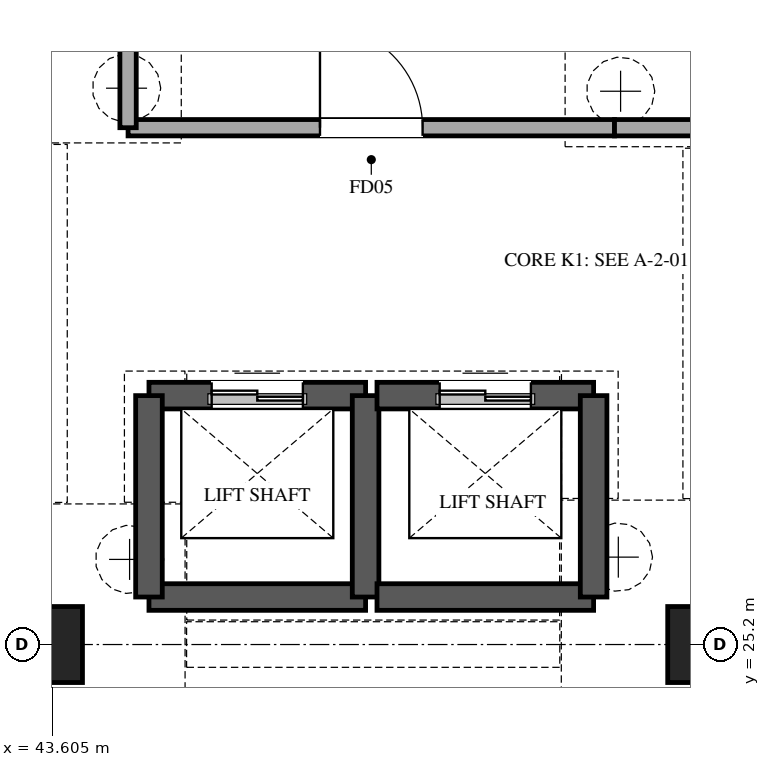
"""IFC4 building model, lengths in metres.
Left out: names, types, materials, properties, quantities, classifications, styles, units other than length and angle.
Written with IfcOpenShell. Run it as: python <this file> out.ifc"""

import sys

from ifc_helpers import new_model, si_unit, direction, frame, frame_2d, origin, origin_2d, place, context, subcontext, project, spatial, rectangle, extrude, element, fill, save


model = new_model("IFC4")
c1 = context("Model", 3, precision=1e-05, world=origin(), true_north=direction((0.0, 1.0)))
c2 = subcontext(c1, "Body", "Model", "MODEL_VIEW")
j1 = project(units=[si_unit("LENGTHUNIT", "METRE"), si_unit("PLANEANGLEUNIT", "RADIAN")], contexts=[c1])
p1 = place(None, origin())
s1 = spatial("IfcSite", under=j1, at=p1, CompositionType="ELEMENT")
p2 = place(p1, origin())
s2 = spatial("IfcBuilding", under=s1, at=p2, CompositionType="ELEMENT")
p3 = place(p2, frame((0.0, 0.0, -9.6)))
s3 = spatial("IfcBuildingStorey", under=s2, at=p3, CompositionType="ELEMENT", Elevation=-9.6)
for number, where, z_axis, x_axis in (
    (1, (43.5, 25.2, 0.0), (0.0, 0.0, 1.0), (1.0, 0.0, 0.0)),
    (2, (52.2, 25.2, 0.0), (0.0, 0.0, 1.0), (1.0, 0.0, 0.0)),
):
    element("IfcColumn", number, at=place(p3, frame(where, z_axis=z_axis, x_axis=x_axis)), inside=s3, PredefinedType="COLUMN", context=c2, shape_type="SweptSolid", body=[
        extrude(rectangle(XDim=1.0, YDim=1.0, at=origin_2d()), origin(), (0.0, 0.0, 1.0), 4.8),
    ])
p4 = place(p3, frame((44.875, 28.475, 0.0), z_axis=(0.0, 0.0, 1.0), x_axis=(1.0, 0.0, 0.0)))
e3 = element("IfcWall", 3, at=p4, inside=s3, PredefinedType="SHEAR", context=c2, shape_type="SweptSolid", body=[
    extrude(rectangle(XDim=2.85, YDim=0.35, at=frame_2d((1.425, 0.0))), origin(), (0.0, 0.0, 1.0), 4.8),
])
p5 = place(p4, frame((0.825, 0.0, 0.0)))
e4 = element("IfcOpeningElement", 4, at=p5, cuts=e3, PredefinedType="OPENING", context=c2, shape_type="SweptSolid", body=[
    extrude(rectangle(XDim=1.2, YDim=2.2, at=frame_2d((0.6, 1.1))), frame((0.0, 0.185, 0.0), z_axis=(0.0, -1.0, 0.0), x_axis=(1.0, 0.0, 0.0)), (0.0, 0.0, 1.0), 0.37),
])
p6 = place(p3, frame((47.725, 25.825, 0.0), z_axis=(0.0, 0.0, 1.0), x_axis=(-1.0, 0.0, 0.0)))
e5 = element("IfcWall", 5, at=p6, inside=s3, PredefinedType="SHEAR", context=c2, shape_type="SweptSolid", body=[
    extrude(rectangle(XDim=2.85, YDim=0.35, at=frame_2d((1.425, 0.0))), origin(), (0.0, 0.0, 1.0), 4.8),
])
for number, where, z_axis, x_axis in (
    (6, (44.875, 25.825, 0.0), (0.0, 0.0, 1.0), (0.0, 1.0, 0.0)),
    (7, (47.725, 28.475, 0.0), (0.0, 0.0, 1.0), (0.0, -1.0, 0.0)),
):
    element("IfcWall", number, at=place(p3, frame(where, z_axis=z_axis, x_axis=x_axis)), inside=s3, PredefinedType="SHEAR", context=c2, shape_type="SweptSolid", body=[
        extrude(rectangle(XDim=2.65, YDim=0.35, at=frame_2d((1.325, 0.0))), origin(), (0.0, 0.0, 1.0), 4.8),
    ])
p7 = place(p3, frame((47.875, 28.475, 0.0), z_axis=(0.0, 0.0, 1.0), x_axis=(1.0, 0.0, 0.0)))
e8 = element("IfcWall", 8, at=p7, inside=s3, PredefinedType="SHEAR", context=c2, shape_type="SweptSolid", body=[
    extrude(rectangle(XDim=2.85, YDim=0.35, at=frame_2d((1.425, 0.0))), origin(), (0.0, 0.0, 1.0), 4.8),
])
p8 = place(p7, frame((0.825, 0.0, 0.0)))
e9 = element("IfcOpeningElement", 9, at=p8, cuts=e8, PredefinedType="OPENING", context=c2, shape_type="SweptSolid", body=[
    extrude(rectangle(XDim=1.2, YDim=2.2, at=frame_2d((0.6, 1.1))), frame((0.0, 0.185, 0.0), z_axis=(0.0, -1.0, 0.0), x_axis=(1.0, 0.0, 0.0)), (0.0, 0.0, 1.0), 0.37),
])
p9 = place(p3, frame((50.725, 25.825, 0.0), z_axis=(0.0, 0.0, 1.0), x_axis=(-1.0, 0.0, 0.0)))
e10 = element("IfcWall", 10, at=p9, inside=s3, PredefinedType="SHEAR", context=c2, shape_type="SweptSolid", body=[
    extrude(rectangle(XDim=2.85, YDim=0.35, at=frame_2d((1.425, 0.0))), origin(), (0.0, 0.0, 1.0), 4.8),
])
p10 = place(p3, frame((50.725, 28.475, 0.0), z_axis=(0.0, 0.0, 1.0), x_axis=(0.0, -1.0, 0.0)))
e11 = element("IfcWall", 11, at=p10, inside=s3, PredefinedType="SHEAR", context=c2, shape_type="SweptSolid", body=[
    extrude(rectangle(XDim=2.65, YDim=0.35, at=frame_2d((1.325, 0.0))), origin(), (0.0, 0.0, 1.0), 4.8),
])
p11 = place(p3, frame((44.6, 32.0, 0.0), z_axis=(0.0, 0.0, 1.0), x_axis=(1.0, 0.0, 0.0)))
e12 = element("IfcWall", 12, at=p11, inside=s3, PredefinedType="PARTITIONING", context=c2, shape_type="SweptSolid", body=[
    extrude(rectangle(XDim=6.4, YDim=0.215, at=frame_2d((3.2, 0.0))), origin(), (0.0, 0.0, 1.0), 4.45),
])
p12 = place(p11, frame((2.525, 0.0, 0.0)))
e13 = element("IfcOpeningElement", 13, at=p12, cuts=e12, PredefinedType="OPENING", context=c2, shape_type="SweptSolid", body=[
    extrude(rectangle(XDim=1.35, YDim=2.2, at=frame_2d((0.675, 1.1))), frame((0.0, 0.118, 0.0), z_axis=(0.0, -1.0, 0.0), x_axis=(1.0, 0.0, 0.0)), (0.0, 0.0, 1.0), 0.235),
])
p13 = place(p3, frame((44.6, 32.0, 0.0), z_axis=(0.0, 0.0, 1.0), x_axis=(0.0, 1.0, 0.0)))
e14 = element("IfcWall", 14, at=p13, inside=s3, PredefinedType="PARTITIONING", context=c2, shape_type="SweptSolid", body=[
    extrude(rectangle(XDim=2.98, YDim=0.215, at=frame_2d((1.49, 0.0))), origin(), (0.0, 0.0, 1.0), 3.67),
])
p14 = place(p3, frame((52.8, 32.0, 0.0), z_axis=(0.0, 0.0, 1.0), x_axis=(-1.0, 0.0, 0.0)))
e15 = element("IfcWall", 15, at=p14, inside=s3, PredefinedType="PARTITIONING", context=c2, shape_type="SweptSolid", body=[
    extrude(rectangle(XDim=1.8, YDim=0.215, at=frame_2d((0.9, 0.0))), origin(), (0.0, 0.0, 1.0), 3.67),
])
p15 = place(p5, origin())
e16 = element("IfcDoor", 16, at=p15, inside=s3, OperationType="DOUBLE_DOOR_SLIDING", PredefinedType="DOOR", context=c2, shape_type="SweptSolid", body=[
    extrude(rectangle(XDim=1.2, YDim=2.2, at=frame_2d((0.6, 1.1))), frame((0.0, 0.025, 0.0), z_axis=(0.0, -1.0, 0.0), x_axis=(1.0, 0.0, 0.0)), (0.0, 0.0, 1.0), 0.05),
])
fill(e4, e16)
p16 = place(p8, origin())
e17 = element("IfcDoor", 17, at=p16, inside=s3, OperationType="DOUBLE_DOOR_SLIDING", PredefinedType="DOOR", context=c2, shape_type="SweptSolid", body=[
    extrude(rectangle(XDim=1.2, YDim=2.2, at=frame_2d((0.6, 1.1))), frame((0.0, 0.025, 0.0), z_axis=(0.0, -1.0, 0.0), x_axis=(1.0, 0.0, 0.0)), (0.0, 0.0, 1.0), 0.05),
])
fill(e9, e17)
p17 = place(p12, origin())
e18 = element("IfcDoor", 18, at=p17, inside=s3, OperationType="SINGLE_SWING_LEFT", PredefinedType="DOOR", context=c2, shape_type="SweptSolid", body=[
    extrude(rectangle(XDim=1.35, YDim=2.2, at=frame_2d((0.675, 1.1))), frame((0.0, 0.025, 0.0), z_axis=(0.0, -1.0, 0.0), x_axis=(1.0, 0.0, 0.0)), (0.0, 0.0, 1.0), 0.05),
])
fill(e13, e18)
save(model, sys.argv[1])
